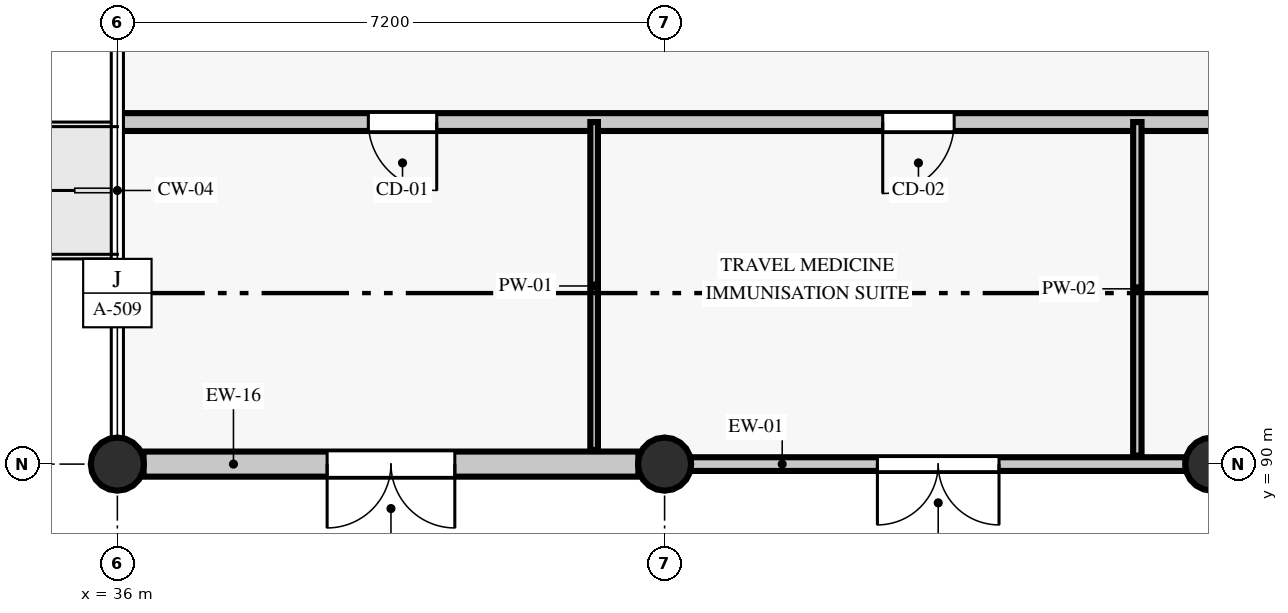
"""IFC4 building model, lengths in metres.
Left out: names, types, materials, properties, quantities, classifications, styles, units other than length and angle.
Written with IfcOpenShell. Run it as: python <this file> out.ifc"""

import sys

from ifc_helpers import new_model, si_unit, direction, frame, frame_2d, origin, origin_2d, place, context, subcontext, project, spatial, rectangle, circle, extrude, element, fill, save


model = new_model("IFC4")
c1 = context("Model", 3, precision=1e-05, world=origin(), true_north=direction((0.0, 1.0)))
c2 = subcontext(c1, "Body", "Model", "MODEL_VIEW")
j1 = project(units=[si_unit("LENGTHUNIT", "METRE"), si_unit("PLANEANGLEUNIT", "RADIAN")], contexts=[c1])
p1 = place(None, origin())
s1 = spatial("IfcSite", under=j1, at=p1, CompositionType="ELEMENT")
p2 = place(p1, origin())
s2 = spatial("IfcBuilding", under=s1, at=p2, CompositionType="ELEMENT")
p3 = place(p2, origin())
s3 = spatial("IfcBuildingStorey", under=s2, at=p3, CompositionType="ELEMENT", Elevation=0.0)
for number, where, z_axis, x_axis in (
    (1, (36.0, 90.0, 0.0), (0.0, 0.0, 1.0), (1.0, 0.0, 0.0)),
    (2, (43.2, 90.0, 0.0), (0.0, 0.0, 1.0), (1.0, 0.0, 0.0)),
    (3, (50.4, 90.0, 0.0), (0.0, 0.0, 1.0), (1.0, 0.0, 0.0)),
):
    element("IfcColumn", number, at=place(p3, frame(where, z_axis=z_axis, x_axis=x_axis)), inside=s3, PredefinedType="COLUMN", context=c2, shape_type="SweptSolid", body=[
        extrude(circle(Radius=0.35, at=origin_2d()), origin(), (0.0, 0.0, 1.0), 4.56),
    ])
p4 = place(p3, frame((36.345, 90.0, 0.0), z_axis=(0.0, 0.0, 1.0), x_axis=(1.0, 0.0, 0.0)))
e4 = element("IfcWall", 4, at=p4, inside=s3, PredefinedType="STANDARD", context=c2, shape_type="SweptSolid", body=[
    extrude(rectangle(XDim=6.51, YDim=0.33, at=frame_2d((3.255, 0.0))), origin(), (0.0, 0.0, 1.0), 3.91),
])
p5 = place(p4, frame((2.415, 0.0, 0.0)))
e5 = element("IfcOpeningElement", 5, at=p5, cuts=e4, PredefinedType="OPENING", context=c2, shape_type="SweptSolid", body=[
    extrude(rectangle(XDim=1.68, YDim=2.2, at=frame_2d((0.84, 1.1))), frame((0.0, 0.175, 0.0), z_axis=(0.0, -1.0, 0.0), x_axis=(1.0, 0.0, 0.0)), (0.0, 0.0, 1.0), 0.35),
])
p6 = place(p3, frame((43.545, 90.0, 0.0), z_axis=(0.0, 0.0, 1.0), x_axis=(1.0, 0.0, 0.0)))
e6 = element("IfcWall", 6, at=p6, inside=s3, PredefinedType="STANDARD", context=c2, shape_type="SweptSolid", body=[
    extrude(rectangle(XDim=6.51, YDim=0.18, at=frame_2d((3.255, 0.0))), origin(), (0.0, 0.0, 1.0), 3.91),
])
p7 = place(p6, frame((2.455, 0.0, 0.0)))
e7 = element("IfcOpeningElement", 7, at=p7, cuts=e6, PredefinedType="OPENING", context=c2, shape_type="SweptSolid", body=[
    extrude(rectangle(XDim=1.6, YDim=2.2, at=frame_2d((0.8, 1.1))), frame((0.0, 0.1, 0.0), z_axis=(0.0, -1.0, 0.0), x_axis=(1.0, 0.0, 0.0)), (0.0, 0.0, 1.0), 0.2),
])
p8 = place(p3, frame((36.04, 94.5, 0.0), z_axis=(0.0, 0.0, 1.0), x_axis=(1.0, 0.0, 0.0)))
e8 = element("IfcWall", 8, at=p8, inside=s3, PredefinedType="PARTITIONING", context=c2, shape_type="SweptSolid", body=[
    extrude(rectangle(XDim=21.54, YDim=0.235, at=frame_2d((10.77, 0.0))), origin(), (0.0, 0.0, 1.0), 3.91),
])
p9 = place(p8, frame((3.262, 0.0, 0.0)))
e9 = element("IfcOpeningElement", 9, at=p9, cuts=e8, PredefinedType="OPENING", context=c2, shape_type="SweptSolid", body=[
    extrude(rectangle(XDim=0.9, YDim=2.08, at=frame_2d((0.45, 1.04))), frame((0.0, 0.127, 0.0), z_axis=(0.0, -1.0, 0.0), x_axis=(1.0, 0.0, 0.0)), (0.0, 0.0, 1.0), 0.255),
])
p10 = place(p8, frame((10.03, 0.0, 0.0)))
e10 = element("IfcOpeningElement", 10, at=p10, cuts=e8, PredefinedType="OPENING", context=c2, shape_type="SweptSolid", body=[
    extrude(rectangle(XDim=0.94, YDim=2.08, at=frame_2d((0.47, 1.04))), frame((0.0, 0.127, 0.0), z_axis=(0.0, -1.0, 0.0), x_axis=(1.0, 0.0, 0.0)), (0.0, 0.0, 1.0), 0.255),
])
p11 = place(p8, frame((17.79, 0.0, 0.0)))
e11 = element("IfcOpeningElement", 11, at=p11, cuts=e8, PredefinedType="OPENING", context=c2, shape_type="SweptSolid", body=[
    extrude(rectangle(XDim=0.98, YDim=2.08, at=frame_2d((0.49, 1.04))), frame((0.0, 0.127, 0.0), z_axis=(0.0, -1.0, 0.0), x_axis=(1.0, 0.0, 0.0)), (0.0, 0.0, 1.0), 0.255),
])
p12 = place(p3, frame((42.273, 90.187, 0.0), z_axis=(0.0, 0.0, 1.0), x_axis=(0.0, 1.0, 0.0)))
e12 = element("IfcWall", 12, at=p12, inside=s3, PredefinedType="PARTITIONING", context=c2, shape_type="SweptSolid", body=[
    extrude(rectangle(XDim=4.313, YDim=0.1, at=frame_2d((2.156, 0.0))), origin(), (0.0, 0.0, 1.0), 4.06),
])
p13 = place(p3, frame((49.42, 90.112, 0.0), z_axis=(0.0, 0.0, 1.0), x_axis=(0.0, 1.0, 0.0)))
e13 = element("IfcWall", 13, at=p13, inside=s3, PredefinedType="PARTITIONING", context=c2, shape_type="SweptSolid", body=[
    extrude(rectangle(XDim=4.388, YDim=0.11, at=frame_2d((2.194, 0.0))), origin(), (0.0, 0.0, 1.0), 4.06),
])
p14 = place(p5, frame((1.68, 0.0, 0.0), z_axis=(0.0, 0.0, 1.0), x_axis=(-1.0, 0.0, 0.0)))
e14 = element("IfcDoor", 14, at=p14, inside=s3, OperationType="DOUBLE_DOOR_SINGLE_SWING", PredefinedType="DOOR", context=c2, shape_type="SweptSolid", body=[
    extrude(rectangle(XDim=1.68, YDim=2.2, at=frame_2d((0.84, 1.1))), frame((0.0, 0.025, 0.0), z_axis=(0.0, -1.0, 0.0), x_axis=(1.0, 0.0, 0.0)), (0.0, 0.0, 1.0), 0.05),
])
fill(e5, e14)
p15 = place(p7, frame((1.6, 0.0, 0.0), z_axis=(0.0, 0.0, 1.0), x_axis=(-1.0, 0.0, 0.0)))
e15 = element("IfcDoor", 15, at=p15, inside=s3, OperationType="DOUBLE_DOOR_SINGLE_SWING", PredefinedType="DOOR", context=c2, shape_type="SweptSolid", body=[
    extrude(rectangle(XDim=1.6, YDim=2.2, at=frame_2d((0.8, 1.1))), frame((0.0, 0.025, 0.0), z_axis=(0.0, -1.0, 0.0), x_axis=(1.0, 0.0, 0.0)), (0.0, 0.0, 1.0), 0.05),
])
fill(e7, e15)
p16 = place(p9, frame((0.9, 0.0, 0.0), z_axis=(0.0, 0.0, 1.0), x_axis=(-1.0, 0.0, 0.0)))
e16 = element("IfcDoor", 16, at=p16, inside=s3, OperationType="SINGLE_SWING_LEFT", PredefinedType="DOOR", context=c2, shape_type="SweptSolid", body=[
    extrude(rectangle(XDim=0.9, YDim=2.08, at=frame_2d((0.45, 1.04))), frame((0.0, 0.025, 0.0), z_axis=(0.0, -1.0, 0.0), x_axis=(1.0, 0.0, 0.0)), (0.0, 0.0, 1.0), 0.05),
])
fill(e9, e16)
p17 = place(p10, frame((0.94, 0.0, 0.0), z_axis=(0.0, 0.0, 1.0), x_axis=(-1.0, 0.0, 0.0)))
e17 = element("IfcDoor", 17, at=p17, inside=s3, OperationType="SINGLE_SWING_RIGHT", PredefinedType="DOOR", context=c2, shape_type="SweptSolid", body=[
    extrude(rectangle(XDim=0.94, YDim=2.08, at=frame_2d((0.47, 1.04))), frame((0.0, 0.025, 0.0), z_axis=(0.0, -1.0, 0.0), x_axis=(1.0, 0.0, 0.0)), (0.0, 0.0, 1.0), 0.05),
])
fill(e10, e17)
save(model, sys.argv[1])
